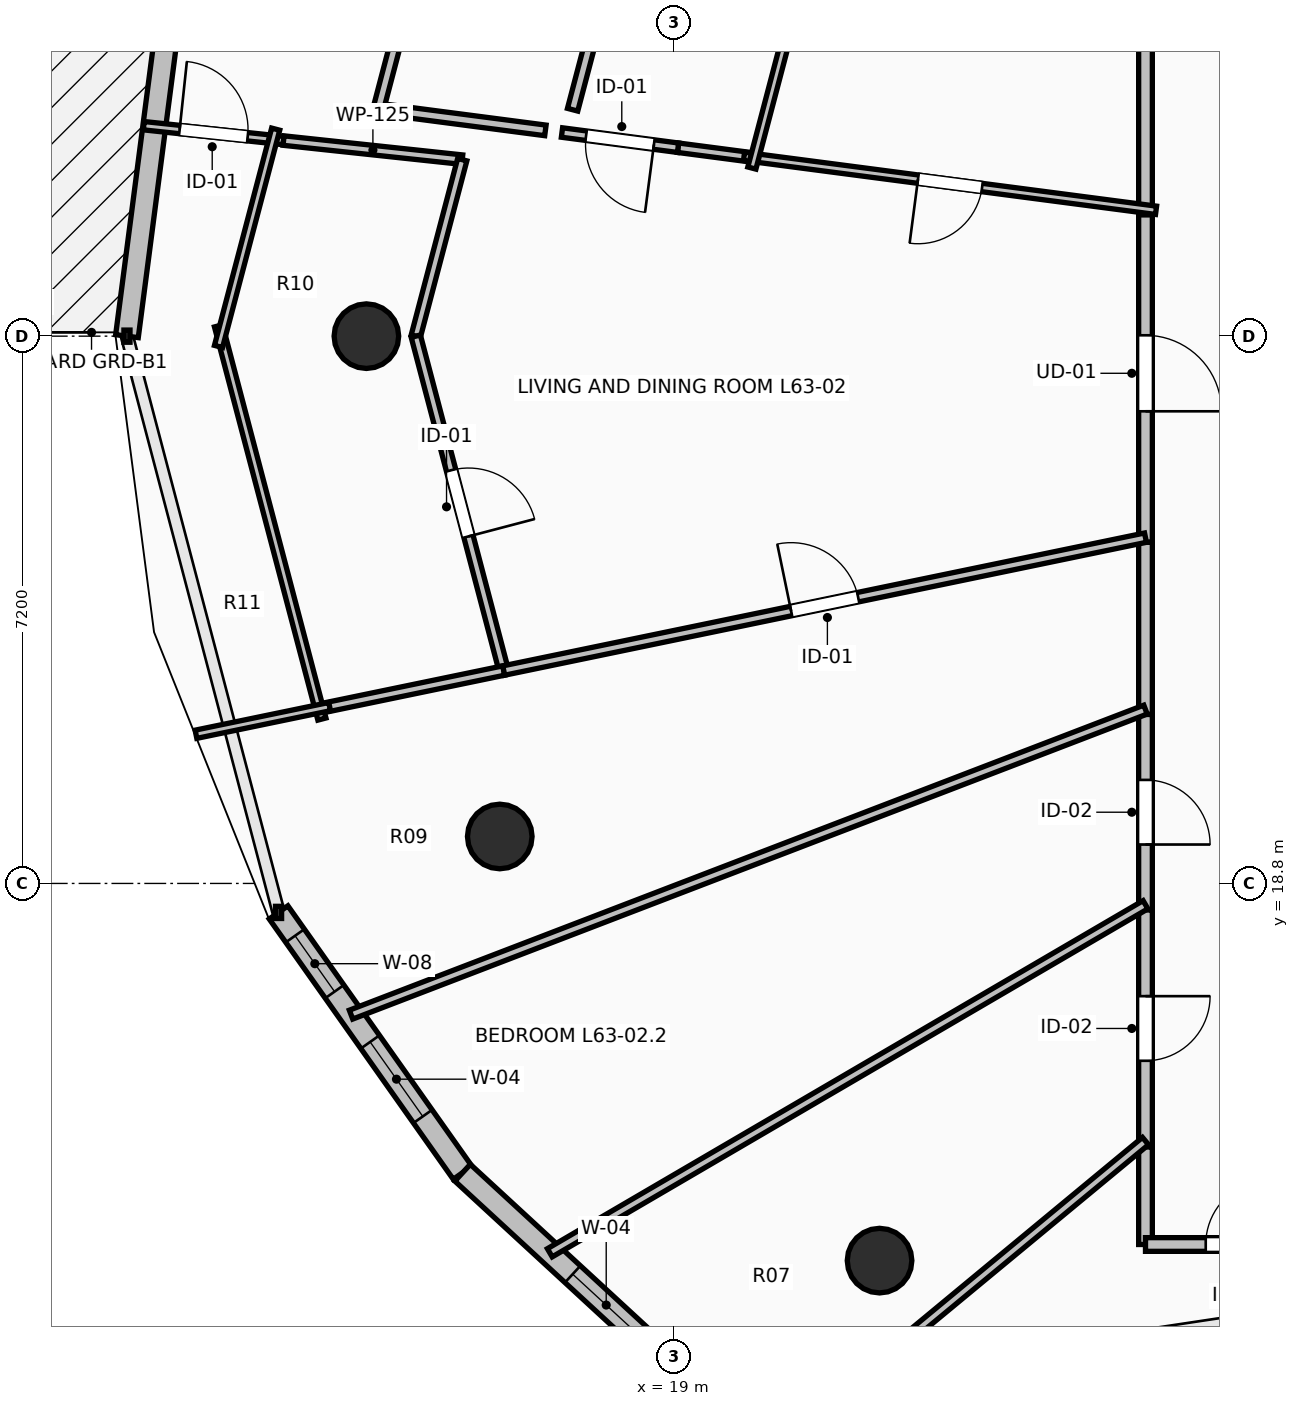
"""IFC4 building model, lengths in metres.
Left out: names, types, materials, properties, quantities, classifications, styles, units other than length and angle.
Written with IfcOpenShell. Run it as: python <this file> out.ifc"""

import sys

from ifc_helpers import new_model, si_unit, direction, frame, frame_2d, origin, origin_2d, place, context, subcontext, project, spatial, rectangle, circle, extrude, element, fill, save


model = new_model("IFC4")
c1 = context("Model", 3, precision=1e-05, world=origin(), true_north=direction((0.0, 1.0)))
c2 = subcontext(c1, "Body", "Model", "MODEL_VIEW")
j1 = project(units=[si_unit("LENGTHUNIT", "METRE"), si_unit("PLANEANGLEUNIT", "RADIAN")], contexts=[c1])
p1 = place(None, origin())
s1 = spatial("IfcSite", under=j1, at=p1, CompositionType="ELEMENT")
p2 = place(p1, origin())
s2 = spatial("IfcBuilding", under=s1, at=p2, CompositionType="ELEMENT")
p3 = place(p2, frame((0.0, 0.0, 234.25)))
s3 = spatial("IfcBuildingStorey", under=s2, at=p3, CompositionType="ELEMENT", Elevation=234.25)
for number, where, z_axis, x_axis in (
    (1, (14.95, 26.0, 0.0), (0.0, 0.0, 1.0), (-1.0, 0.0, 0.0)),
    (2, (16.705, 19.418, 0.0), (0.0, 0.0, 1.0), (-0.924, -0.383, 0.0)),
    (3, (21.701, 13.838, 0.0), (0.0, 0.0, 1.0), (-0.707, -0.707, 0.0)),
):
    element("IfcColumn", number, at=place(p3, frame(where, z_axis=z_axis, x_axis=x_axis)), inside=s3, PredefinedType="COLUMN", context=c2, shape_type="SweptSolid", body=[
        extrude(circle(Radius=0.425, at=origin_2d()), origin(), (0.0, 0.0, 1.0), 3.55),
    ])
p4 = place(p3, frame((12.303, 29.865, 0.0), z_axis=(0.0, 0.0, 1.0), x_axis=(-0.129167789917, -0.991622751881, 0.0)))
e4 = element("IfcWall", 4, at=p4, inside=s3, PredefinedType="STANDARD", context=c2, shape_type="SweptSolid", body=[
    extrude(rectangle(XDim=3.897, YDim=0.3, at=frame_2d((1.949, 0.0))), origin(), (0.0, 0.0, 1.0), 3.29),
])
p5 = place(p3, frame((13.794, 18.419, 0.0), z_axis=(0.0, 0.0, 1.0), x_axis=(0.577261247247, -0.816559521668, 0.0)))
e5 = element("IfcWall", 5, at=p5, inside=s3, PredefinedType="STANDARD", context=c2, shape_type="SweptSolid", body=[
    extrude(rectangle(XDim=4.194, YDim=0.3, at=frame_2d((2.097, 0.0))), origin(), (0.0, 0.0, 1.0), 3.29),
])
p6 = place(p5, frame((0.376, 0.0, 0.85)))
e6 = element("IfcOpeningElement", 6, at=p6, cuts=e5, PredefinedType="OPENING", context=c2, shape_type="SweptSolid", body=[
    extrude(rectangle(XDim=0.9, YDim=1.8, at=frame_2d((0.45, 0.9))), frame((0.0, 0.165, 0.0), z_axis=(0.0, -1.0, 0.0), x_axis=(1.0, 0.0, 0.0)), (0.0, 0.0, 1.0), 0.33),
])
p7 = place(p5, frame((2.087, 0.0, 0.85)))
e7 = element("IfcOpeningElement", 7, at=p7, cuts=e5, PredefinedType="OPENING", context=c2, shape_type="SweptSolid", body=[
    extrude(rectangle(XDim=1.2, YDim=1.95, at=frame_2d((0.6, 0.975))), frame((0.0, 0.165, 0.0), z_axis=(0.0, -1.0, 0.0), x_axis=(1.0, 0.0, 0.0)), (0.0, 0.0, 1.0), 0.33),
])
p8 = place(p3, frame((16.216, 14.994, 0.0), z_axis=(0.0, 0.0, 1.0), x_axis=(0.735445373611, -0.677584018727, 0.0)))
e8 = element("IfcWall", 8, at=p8, inside=s3, PredefinedType="STANDARD", context=c2, shape_type="SweptSolid", body=[
    extrude(rectangle(XDim=4.43, YDim=0.3, at=frame_2d((2.215, 0.0))), origin(), (0.0, 0.0, 1.0), 3.29),
])
p9 = place(p8, frame((1.969, 0.0, 0.85)))
e9 = element("IfcOpeningElement", 9, at=p9, cuts=e8, PredefinedType="OPENING", context=c2, shape_type="SweptSolid", body=[
    extrude(rectangle(XDim=1.2, YDim=1.95, at=frame_2d((0.6, 0.975))), frame((0.0, 0.165, 0.0), z_axis=(0.0, -1.0, 0.0), x_axis=(1.0, 0.0, 0.0)), (0.0, 0.0, 1.0), 0.33),
])
p10 = place(p3, frame((25.2, 27.735, 0.0), z_axis=(0.0, 0.0, 1.0), x_axis=(0.0, -1.0, 0.0)))
e10 = element("IfcWall", 10, at=p10, inside=s3, PredefinedType="PARTITIONING", context=c2, shape_type="SweptSolid", body=[
    extrude(rectangle(XDim=4.447, YDim=0.18, at=frame_2d((2.224, 0.0))), origin(), (0.0, 0.0, 1.0), 2.482),
])
p11 = place(p10, frame((1.723, 0.0, 0.0)))
e11 = element("IfcOpeningElement", 11, at=p11, cuts=e10, PredefinedType="OPENING", context=c2, shape_type="SweptSolid", body=[
    extrude(rectangle(XDim=1.0, YDim=2.15, at=frame_2d((0.5, 1.075))), frame((0.0, 0.105, 0.0), z_axis=(0.0, -1.0, 0.0), x_axis=(1.0, 0.0, 0.0)), (0.0, 0.0, 1.0), 0.21),
])
p12 = place(p3, frame((25.2, 31.382, 0.0), z_axis=(0.0, 0.0, 1.0), x_axis=(0.0, -1.0, 0.0)))
e12 = element("IfcWall", 12, at=p12, inside=s3, PredefinedType="PARTITIONING", context=c2, shape_type="SweptSolid", body=[
    extrude(rectangle(XDim=3.787, YDim=0.18, at=frame_2d((1.894, 0.0))), origin(), (0.0, 0.0, 1.0), 2.482),
])
p13 = place(p3, frame((25.2, 23.288, 0.0), z_axis=(0.0, 0.0, 1.0), x_axis=(0.0, -1.0, 0.0)))
e13 = element("IfcWall", 13, at=p13, inside=s3, PredefinedType="PARTITIONING", context=c2, shape_type="SweptSolid", body=[
    extrude(rectangle(XDim=2.265, YDim=0.18, at=frame_2d((1.133, 0.0))), origin(), (0.0, 0.0, 1.0), 3.29),
])
p14 = place(p3, frame((25.2, 21.023, 0.0), z_axis=(0.0, 0.0, 1.0), x_axis=(0.0, -1.0, 0.0)))
e14 = element("IfcWall", 14, at=p14, inside=s3, PredefinedType="PARTITIONING", context=c2, shape_type="SweptSolid", body=[
    extrude(rectangle(XDim=2.572, YDim=0.18, at=frame_2d((1.286, 0.0))), origin(), (0.0, 0.0, 1.0), 3.29),
])
p15 = place(p14, frame((0.861, 0.0, 0.0)))
e15 = element("IfcOpeningElement", 15, at=p15, cuts=e14, PredefinedType="OPENING", context=c2, shape_type="SweptSolid", body=[
    extrude(rectangle(XDim=0.85, YDim=2.1, at=frame_2d((0.425, 1.05))), frame((0.0, 0.105, 0.0), z_axis=(0.0, -1.0, 0.0), x_axis=(1.0, 0.0, 0.0)), (0.0, 0.0, 1.0), 0.21),
])
p16 = place(p3, frame((25.2, 18.451, 0.0), z_axis=(0.0, 0.0, 1.0), x_axis=(0.0, -1.0, 0.0)))
e16 = element("IfcWall", 16, at=p16, inside=s3, PredefinedType="PARTITIONING", context=c2, shape_type="SweptSolid", body=[
    extrude(rectangle(XDim=3.118, YDim=0.18, at=frame_2d((1.559, 0.0))), origin(), (0.0, 0.0, 1.0), 2.482),
])
p17 = place(p16, frame((1.134, 0.0, 0.0)))
e17 = element("IfcOpeningElement", 17, at=p17, cuts=e16, PredefinedType="OPENING", context=c2, shape_type="SweptSolid", body=[
    extrude(rectangle(XDim=0.85, YDim=2.1, at=frame_2d((0.425, 1.05))), frame((0.0, 0.105, 0.0), z_axis=(0.0, -1.0, 0.0), x_axis=(1.0, 0.0, 0.0)), (0.0, 0.0, 1.0), 0.21),
])
p18 = place(p3, frame((25.2, 15.333, 0.0), z_axis=(0.0, 0.0, 1.0), x_axis=(0.0, -1.0, 0.0)))
e18 = element("IfcWall", 18, at=p18, inside=s3, PredefinedType="PARTITIONING", context=c2, shape_type="SweptSolid", body=[
    extrude(rectangle(XDim=1.283, YDim=0.18, at=frame_2d((0.642, 0.0))), origin(), (0.0, 0.0, 1.0), 2.482),
])
p19 = place(p3, frame((25.2, 14.05, 0.0), z_axis=(0.0, 0.0, 1.0), x_axis=(1.0, 0.0, 0.0)))
e19 = element("IfcWall", 19, at=p19, inside=s3, PredefinedType="PARTITIONING", context=c2, shape_type="SweptSolid", body=[
    extrude(rectangle(XDim=2.435, YDim=0.18, at=frame_2d((1.218, 0.0))), origin(), (0.0, 0.0, 1.0), 2.924),
])
p20 = place(p19, frame((0.792, 0.0, 0.0)))
e20 = element("IfcOpeningElement", 20, at=p20, cuts=e19, PredefinedType="OPENING", context=c2, shape_type="SweptSolid", body=[
    extrude(rectangle(XDim=0.85, YDim=2.1, at=frame_2d((0.425, 1.05))), frame((0.0, 0.105, 0.0), z_axis=(0.0, -1.0, 0.0), x_axis=(1.0, 0.0, 0.0)), (0.0, 0.0, 1.0), 0.21),
])
p21 = place(p3, frame((20.057, 28.347, 0.0), z_axis=(0.0, 0.0, 1.0), x_axis=(-0.99150495655, 0.130068909188, 0.0)))
e21 = element("IfcWall", 21, at=p21, inside=s3, PredefinedType="PARTITIONING", context=c2, shape_type="SweptSolid", body=[
    extrude(rectangle(XDim=1.015, YDim=0.125, at=frame_2d((0.508, 0.0))), origin(), (0.0, 0.0, 1.0), 2.924),
])
p22 = place(p3, frame((19.05, 28.479, 0.0), z_axis=(0.0, 0.0, 1.0), x_axis=(-0.991536647804, 0.129827100648, 0.0)))
e22 = element("IfcWall", 22, at=p22, inside=s3, PredefinedType="PARTITIONING", context=c2, shape_type="SweptSolid", body=[
    extrude(rectangle(XDim=1.54, YDim=0.125, at=frame_2d((0.77, 0.0))), origin(), (0.0, 0.0, 1.0), 3.29),
])
p23 = place(p22, frame((0.32, 0.0, 0.0)))
e23 = element("IfcOpeningElement", 23, at=p23, cuts=e22, PredefinedType="OPENING", context=c2, shape_type="SweptSolid", body=[
    extrude(rectangle(XDim=0.9, YDim=2.1, at=frame_2d((0.45, 1.05))), frame((0.0, 0.077, 0.0), z_axis=(0.0, -1.0, 0.0), x_axis=(1.0, 0.0, 0.0)), (0.0, 0.0, 1.0), 0.155),
])
p24 = place(p3, frame((25.339, 27.656, 0.0), z_axis=(0.0, 0.0, 1.0), x_axis=(-0.991543288598, 0.129776372412, 0.0)))
e24 = element("IfcWall", 24, at=p24, inside=s3, PredefinedType="PARTITIONING", context=c2, shape_type="SweptSolid", body=[
    extrude(rectangle(XDim=5.467, YDim=0.11, at=frame_2d((2.733, 0.0))), origin(), (0.0, 0.0, 1.0), 2.482),
])
p25 = place(p24, frame((2.308, 0.0, 0.0)))
e25 = element("IfcOpeningElement", 25, at=p25, cuts=e24, PredefinedType="OPENING", context=c2, shape_type="SweptSolid", body=[
    extrude(rectangle(XDim=0.85, YDim=2.1, at=frame_2d((0.425, 1.05))), frame((0.0, 0.07, 0.0), z_axis=(0.0, -1.0, 0.0), x_axis=(1.0, 0.0, 0.0)), (0.0, 0.0, 1.0), 0.14),
])
p26 = place(p3, frame((12.021, 28.769, 0.0), z_axis=(0.0, 0.0, 1.0), x_axis=(0.994395705484, -0.105722187429, 0.0)))
e26 = element("IfcWall", 26, at=p26, inside=s3, PredefinedType="PARTITIONING", context=c2, shape_type="SweptSolid", body=[
    extrude(rectangle(XDim=1.85, YDim=0.11, at=frame_2d((0.925, 0.0))), origin(), (0.0, 0.0, 1.0), 3.29),
])
p27 = place(p26, frame((0.475, 0.0, 0.0)))
e27 = element("IfcOpeningElement", 27, at=p27, cuts=e26, PredefinedType="OPENING", context=c2, shape_type="SweptSolid", body=[
    extrude(rectangle(XDim=0.9, YDim=2.1, at=frame_2d((0.45, 1.05))), frame((0.0, 0.07, 0.0), z_axis=(0.0, -1.0, 0.0), x_axis=(1.0, 0.0, 0.0)), (0.0, 0.0, 1.0), 0.14),
])
p28 = place(p3, frame((13.86, 28.573, 0.0), z_axis=(0.0, 0.0, 1.0), x_axis=(0.994349321614, -0.106157555574, 0.0)))
e28 = element("IfcWall", 28, at=p28, inside=s3, PredefinedType="PARTITIONING", context=c2, shape_type="SweptSolid", body=[
    extrude(rectangle(XDim=2.364, YDim=0.125, at=frame_2d((1.182, 0.0))), origin(), (0.0, 0.0, 1.0), 2.874),
])
p29 = place(p3, frame((16.211, 28.322, 0.0), z_axis=(0.0, 0.0, 1.0), x_axis=(-0.254408212112, -0.96709692462, 0.0)))
e29 = element("IfcWall", 29, at=p29, inside=s3, PredefinedType="PARTITIONING", context=c2, shape_type="SweptSolid", body=[
    extrude(rectangle(XDim=2.401, YDim=0.125, at=frame_2d((1.201, 0.0))), origin(), (0.0, 0.0, 1.0), 2.482),
])
p30 = place(p3, frame((15.6, 26.0, 0.0), z_axis=(0.0, 0.0, 1.0), x_axis=(0.25436383836, -0.967108596661, 0.0)))
e30 = element("IfcWall", 30, at=p30, inside=s3, PredefinedType="PARTITIONING", context=c2, shape_type="SweptSolid", body=[
    extrude(rectangle(XDim=4.549, YDim=0.125, at=frame_2d((2.274, 0.0))), origin(), (0.0, 0.0, 1.0), 2.482),
])
p31 = place(p30, frame((1.824, 0.0, 0.0)))
e31 = element("IfcOpeningElement", 31, at=p31, cuts=e30, PredefinedType="OPENING", context=c2, shape_type="SweptSolid", body=[
    extrude(rectangle(XDim=0.9, YDim=2.1, at=frame_2d((0.45, 1.05))), frame((0.0, 0.077, 0.0), z_axis=(0.0, -1.0, 0.0), x_axis=(1.0, 0.0, 0.0)), (0.0, 0.0, 1.0), 0.155),
])
p32 = place(p3, frame((16.757, 21.601, 0.0), z_axis=(0.0, 0.0, 1.0), x_axis=(-0.979193678003, -0.2029279206, 0.0)))
e32 = element("IfcWall", 32, at=p32, inside=s3, PredefinedType="PARTITIONING", context=c2, shape_type="SweptSolid", body=[
    extrude(rectangle(XDim=2.479, YDim=0.125, at=frame_2d((1.24, 0.0))), origin(), (0.0, 0.0, 1.0), 2.874),
])
p33 = place(p3, frame((16.757, 21.601, 0.0), z_axis=(0.0, 0.0, 1.0), x_axis=(0.979226116247, 0.20277133244, 0.0)))
e33 = element("IfcWall", 33, at=p33, inside=s3, PredefinedType="PARTITIONING", context=c2, shape_type="SweptSolid", body=[
    extrude(rectangle(XDim=8.622, YDim=0.125, at=frame_2d((4.311, 0.0))), origin(), (0.0, 0.0, 1.0), 2.924),
])
p34 = place(p33, frame((3.861, 0.0, 0.0)))
e34 = element("IfcOpeningElement", 34, at=p34, cuts=e33, PredefinedType="OPENING", context=c2, shape_type="SweptSolid", body=[
    extrude(rectangle(XDim=0.9, YDim=2.1, at=frame_2d((0.45, 1.05))), frame((0.0, 0.077, 0.0), z_axis=(0.0, -1.0, 0.0), x_axis=(1.0, 0.0, 0.0)), (0.0, 0.0, 1.0), 0.155),
])
p35 = place(p3, frame((20.021, 28.212, 0.0), z_axis=(0.0, 0.0, 1.0), x_axis=(0.254539154478, 0.967062468943, 0.0)))
e35 = element("IfcWall", 35, at=p35, inside=s3, PredefinedType="PARTITIONING", context=c2, shape_type="SweptSolid", body=[
    extrude(rectangle(XDim=3.407, YDim=0.11, at=frame_2d((1.704, 0.0))), origin(), (0.0, 0.0, 1.0), 2.482),
])
p36 = place(p3, frame((14.365, 20.963, 0.0), z_axis=(0.0, 0.0, 1.0), x_axis=(-0.254288836667, 0.967128320104, 0.0)))
e36 = element("IfcWall", 36, at=p36, inside=s3, PredefinedType="PARTITIONING", context=c2, shape_type="SweptSolid", body=[
    extrude(rectangle(XDim=5.349, YDim=0.11, at=frame_2d((2.674, 0.0))), origin(), (0.0, 0.0, 1.0), 3.29),
])
p37 = place(p3, frame((13.004, 25.865, 0.0), z_axis=(0.0, 0.0, 1.0), x_axis=(0.254448582557, 0.967086303716, 0.0)))
e37 = element("IfcWall", 37, at=p37, inside=s3, PredefinedType="PARTITIONING", context=c2, shape_type="SweptSolid", body=[
    extrude(rectangle(XDim=2.956, YDim=0.11, at=frame_2d((1.478, 0.0))), origin(), (0.0, 0.0, 1.0), 3.29),
])
p38 = place(p3, frame((12.708, 20.763, 0.0), z_axis=(0.0, 0.0, 1.0), x_axis=(0.979256697864, 0.202623591143, 0.0)))
e38 = element("IfcWall", 38, at=p38, inside=s3, PredefinedType="PARTITIONING", context=c2, shape_type="SweptSolid", body=[
    extrude(rectangle(XDim=1.795, YDim=0.11, at=frame_2d((0.898, 0.0))), origin(), (0.0, 0.0, 1.0), 3.29),
])
p39 = place(p3, frame((14.748, 17.074, 0.0), z_axis=(0.0, 0.0, 1.0), x_axis=(0.93355564233, 0.358432507836, 0.0)))
e39 = element("IfcWall", 39, at=p39, inside=s3, PredefinedType="PARTITIONING", context=c2, shape_type="SweptSolid", body=[
    extrude(rectangle(XDim=11.196, YDim=0.125, at=frame_2d((5.598, 0.0))), origin(), (0.0, 0.0, 1.0), 2.482),
])
p40 = place(p3, frame((17.363, 13.941, 0.0), z_axis=(0.0, 0.0, 1.0), x_axis=(0.863415767124, 0.5044930258, 0.0)))
e40 = element("IfcWall", 40, at=p40, inside=s3, PredefinedType="PARTITIONING", context=c2, shape_type="SweptSolid", body=[
    extrude(rectangle(XDim=9.077, YDim=0.125, at=frame_2d((4.538, 0.0))), origin(), (0.0, 0.0, 1.0), 2.482),
])
p41 = place(p3, frame((20.387, 11.429, 0.0), z_axis=(0.0, 0.0, 1.0), x_axis=(0.770490958976, 0.637450925277, 0.0)))
e41 = element("IfcWall", 41, at=p41, inside=s3, PredefinedType="PARTITIONING", context=c2, shape_type="SweptSolid", body=[
    extrude(rectangle(XDim=6.247, YDim=0.125, at=frame_2d((3.123, 0.0))), origin(), (0.0, 0.0, 1.0), 2.482),
])
p42 = place(p3, frame((23.584, 9.475, 0.0), z_axis=(0.0, 0.0, 1.0), x_axis=(0.657373610703, 0.75356481868, 0.0)))
e42 = element("IfcWall", 42, at=p42, inside=s3, PredefinedType="PARTITIONING", context=c2, shape_type="SweptSolid", body=[
    extrude(rectangle(XDim=6.071, YDim=0.125, at=frame_2d((3.036, 0.0))), origin(), (0.0, 0.0, 1.0), 2.874),
])
p43 = place(p3, frame((17.305, 28.707, 0.0), z_axis=(0.0, 0.0, 1.0), x_axis=(-0.991583198316, 0.129471081011, 0.0)))
e43 = element("IfcWall", 43, at=p43, inside=s3, PredefinedType="PARTITIONING", context=c2, shape_type="SweptSolid", body=[
    extrude(rectangle(XDim=2.216, YDim=0.14, at=frame_2d((1.108, 0.0))), origin(), (0.0, 0.0, 1.0), 2.874),
])
p44 = place(p3, frame((15.108, 28.994, 0.0), z_axis=(0.0, 0.0, 1.0), x_axis=(0.254393917139, 0.967100684997, 0.0)))
e44 = element("IfcWall", 44, at=p44, inside=s3, PredefinedType="PARTITIONING", context=c2, shape_type="SweptSolid", body=[
    extrude(rectangle(XDim=3.99, YDim=0.14, at=frame_2d((1.995, 0.0))), origin(), (0.0, 0.0, 1.0), 3.29),
])
p45 = place(p3, frame((18.488, 32.112, 0.0), z_axis=(0.0, 0.0, 1.0), x_axis=(-0.254626828673, -0.967039388091, 0.0)))
e45 = element("IfcWall", 45, at=p45, inside=s3, PredefinedType="PARTITIONING", context=c2, shape_type="SweptSolid", body=[
    extrude(rectangle(XDim=3.24, YDim=0.14, at=frame_2d((1.62, 0.0))), origin(), (0.0, 0.0, 1.0), 2.482),
])
p46 = place(p6, origin())
e46 = element("IfcWindow", 46, at=p46, inside=s3, PartitioningType="SINGLE_PANEL", PredefinedType="WINDOW", context=c2, shape_type="SweptSolid", body=[
    extrude(rectangle(XDim=0.9, YDim=1.8, at=frame_2d((0.45, 0.9))), frame((0.0, 0.03, 0.0), z_axis=(0.0, -1.0, 0.0), x_axis=(1.0, 0.0, 0.0)), (0.0, 0.0, 1.0), 0.06),
])
fill(e6, e46)
p47 = place(p7, origin())
e47 = element("IfcWindow", 47, at=p47, inside=s3, PartitioningType="SINGLE_PANEL", PredefinedType="WINDOW", context=c2, shape_type="SweptSolid", body=[
    extrude(rectangle(XDim=1.2, YDim=1.95, at=frame_2d((0.6, 0.975))), frame((0.0, 0.03, 0.0), z_axis=(0.0, -1.0, 0.0), x_axis=(1.0, 0.0, 0.0)), (0.0, 0.0, 1.0), 0.06),
])
fill(e7, e47)
p48 = place(p9, origin())
e48 = element("IfcWindow", 48, at=p48, inside=s3, PartitioningType="SINGLE_PANEL", PredefinedType="WINDOW", context=c2, shape_type="SweptSolid", body=[
    extrude(rectangle(XDim=1.2, YDim=1.95, at=frame_2d((0.6, 0.975))), frame((0.0, 0.03, 0.0), z_axis=(0.0, -1.0, 0.0), x_axis=(1.0, 0.0, 0.0)), (0.0, 0.0, 1.0), 0.06),
])
fill(e9, e48)
p49 = place(p11, origin())
e49 = element("IfcDoor", 49, at=p49, inside=s3, OperationType="SINGLE_SWING_RIGHT", PredefinedType="DOOR", context=c2, shape_type="SweptSolid", body=[
    extrude(rectangle(XDim=1.0, YDim=2.15, at=frame_2d((0.5, 1.075))), frame((0.0, 0.025, 0.0), z_axis=(0.0, -1.0, 0.0), x_axis=(1.0, 0.0, 0.0)), (0.0, 0.0, 1.0), 0.05),
])
fill(e11, e49)
p50 = place(p23, origin())
e50 = element("IfcDoor", 50, at=p50, inside=s3, OperationType="SINGLE_SWING_LEFT", PredefinedType="DOOR", context=c2, shape_type="SweptSolid", body=[
    extrude(rectangle(XDim=0.9, YDim=2.1, at=frame_2d((0.45, 1.05))), frame((0.0, 0.025, 0.0), z_axis=(0.0, -1.0, 0.0), x_axis=(1.0, 0.0, 0.0)), (0.0, 0.0, 1.0), 0.05),
])
fill(e23, e50)
p51 = place(p25, origin())
e51 = element("IfcDoor", 51, at=p51, inside=s3, OperationType="SINGLE_SWING_RIGHT", PredefinedType="DOOR", context=c2, shape_type="SweptSolid", body=[
    extrude(rectangle(XDim=0.85, YDim=2.1, at=frame_2d((0.425, 1.05))), frame((0.0, 0.025, 0.0), z_axis=(0.0, -1.0, 0.0), x_axis=(1.0, 0.0, 0.0)), (0.0, 0.0, 1.0), 0.05),
])
fill(e25, e51)
p52 = place(p27, origin())
e52 = element("IfcDoor", 52, at=p52, inside=s3, OperationType="SINGLE_SWING_LEFT", PredefinedType="DOOR", context=c2, shape_type="SweptSolid", body=[
    extrude(rectangle(XDim=0.9, YDim=2.1, at=frame_2d((0.45, 1.05))), frame((0.0, 0.025, 0.0), z_axis=(0.0, -1.0, 0.0), x_axis=(1.0, 0.0, 0.0)), (0.0, 0.0, 1.0), 0.05),
])
fill(e27, e52)
p53 = place(p31, origin())
e53 = element("IfcDoor", 53, at=p53, inside=s3, OperationType="SINGLE_SWING_RIGHT", PredefinedType="DOOR", context=c2, shape_type="SweptSolid", body=[
    extrude(rectangle(XDim=0.9, YDim=2.1, at=frame_2d((0.45, 1.05))), frame((0.0, 0.025, 0.0), z_axis=(0.0, -1.0, 0.0), x_axis=(1.0, 0.0, 0.0)), (0.0, 0.0, 1.0), 0.05),
])
fill(e31, e53)
p54 = place(p34, origin())
e54 = element("IfcDoor", 54, at=p54, inside=s3, OperationType="SINGLE_SWING_LEFT", PredefinedType="DOOR", context=c2, shape_type="SweptSolid", body=[
    extrude(rectangle(XDim=0.9, YDim=2.1, at=frame_2d((0.45, 1.05))), frame((0.0, 0.025, 0.0), z_axis=(0.0, -1.0, 0.0), x_axis=(1.0, 0.0, 0.0)), (0.0, 0.0, 1.0), 0.05),
])
fill(e34, e54)
p55 = place(p15, origin())
e55 = element("IfcDoor", 55, at=p55, inside=s3, OperationType="SINGLE_SWING_RIGHT", PredefinedType="DOOR", context=c2, shape_type="SweptSolid", body=[
    extrude(rectangle(XDim=0.85, YDim=2.1, at=frame_2d((0.425, 1.05))), frame((0.0, 0.025, 0.0), z_axis=(0.0, -1.0, 0.0), x_axis=(1.0, 0.0, 0.0)), (0.0, 0.0, 1.0), 0.05),
])
fill(e15, e55)
p56 = place(p17, origin())
e56 = element("IfcDoor", 56, at=p56, inside=s3, OperationType="SINGLE_SWING_LEFT", PredefinedType="DOOR", context=c2, shape_type="SweptSolid", body=[
    extrude(rectangle(XDim=0.85, YDim=2.1, at=frame_2d((0.425, 1.05))), frame((0.0, 0.025, 0.0), z_axis=(0.0, -1.0, 0.0), x_axis=(1.0, 0.0, 0.0)), (0.0, 0.0, 1.0), 0.05),
])
fill(e17, e56)
p57 = place(p20, origin())
e57 = element("IfcDoor", 57, at=p57, inside=s3, OperationType="SINGLE_SWING_RIGHT", PredefinedType="DOOR", context=c2, shape_type="SweptSolid", body=[
    extrude(rectangle(XDim=0.85, YDim=2.1, at=frame_2d((0.425, 1.05))), frame((0.0, 0.025, 0.0), z_axis=(0.0, -1.0, 0.0), x_axis=(1.0, 0.0, 0.0)), (0.0, 0.0, 1.0), 0.05),
])
fill(e20, e57)
save(model, sys.argv[1])
